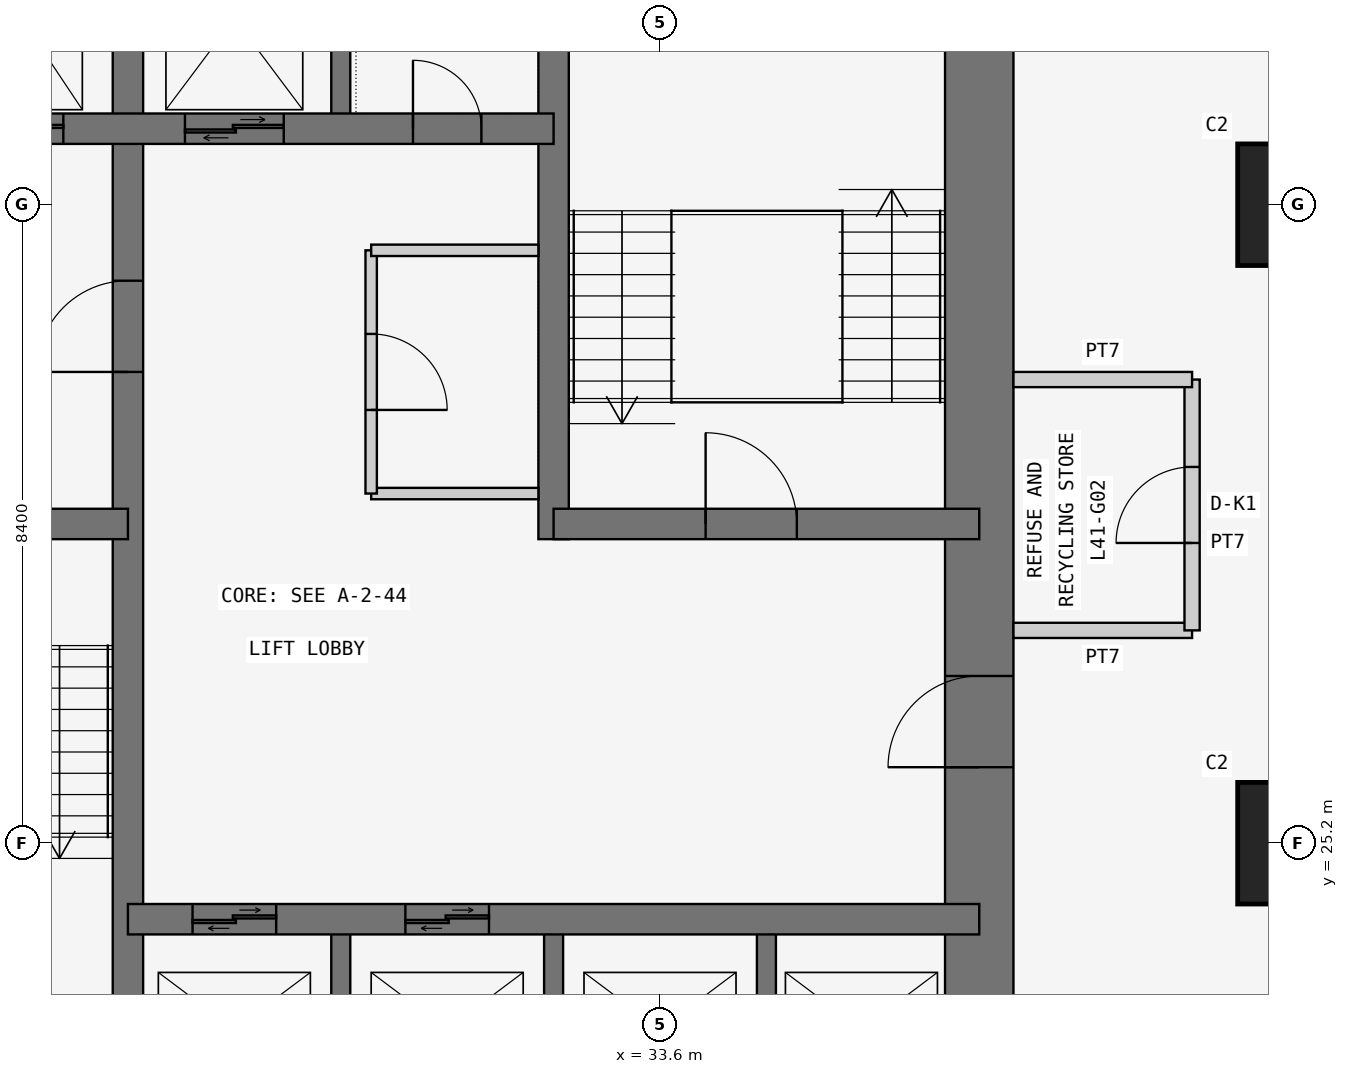
"""IFC4 building model, lengths in metres.
Left out: names, types, materials, properties, quantities, classifications, styles, units other than length and angle.
Written with IfcOpenShell. Run it as: python <this file> out.ifc"""

import sys

from ifc_helpers import new_model, si_unit, direction, frame, frame_2d, origin, origin_2d, place, context, subcontext, project, spatial, rectangle, extrude, element, fill, save


model = new_model("IFC4")
c1 = context("Model", 3, precision=1e-05, world=origin(), true_north=direction((0.0, 1.0)))
c2 = subcontext(c1, "Body", "Model", "MODEL_VIEW")
j1 = project(units=[si_unit("LENGTHUNIT", "METRE"), si_unit("PLANEANGLEUNIT", "RADIAN")], contexts=[c1])
p1 = place(None, origin())
s1 = spatial("IfcSite", under=j1, at=p1, CompositionType="ELEMENT")
p2 = place(p1, origin())
s2 = spatial("IfcBuilding", under=s1, at=p2, CompositionType="ELEMENT")
p3 = place(p2, frame((0.0, 0.0, 159.3)))
s3 = spatial("IfcBuildingStorey", under=s2, at=p3, CompositionType="ELEMENT", Elevation=159.3)
for number, where, z_axis, x_axis in (
    (1, (42.0, 25.2, 0.0), (0.0, 0.0, 1.0), (1.0, 0.0, 0.0)),
    (2, (42.0, 33.6, 0.0), (0.0, 0.0, 1.0), (1.0, 0.0, 0.0)),
):
    element("IfcColumn", number, at=place(p3, frame(where, z_axis=z_axis, x_axis=x_axis)), inside=s3, PredefinedType="COLUMN", context=c2, shape_type="SweptSolid", body=[
        extrude(rectangle(XDim=1.6, YDim=1.6, at=origin_2d()), origin(), (0.0, 0.0, 1.0), 3.6),
    ])
p4 = place(p3, frame((37.8, 21.0, 0.0), z_axis=(0.0, 0.0, 1.0), x_axis=(0.0, 1.0, 0.0)))
e3 = element("IfcWall", 3, at=p4, inside=s3, PredefinedType="SHEAR", context=c2, shape_type="SweptSolid", body=[
    extrude(rectangle(XDim=17.25, YDim=0.9, at=frame_2d((8.625, 0.0))), origin(), (0.0, 0.0, 1.0), 3.6),
])
p5 = place(p4, frame((5.2, 0.0, 0.0)))
e4 = element("IfcOpeningElement", 4, at=p5, cuts=e3, PredefinedType="OPENING", context=c2, shape_type="SweptSolid", body=[
    extrude(rectangle(XDim=1.2, YDim=2.1, at=frame_2d((0.6, 1.05))), frame((0.0, 0.46, 0.0), z_axis=(0.0, -1.0, 0.0), x_axis=(1.0, 0.0, 0.0)), (0.0, 0.0, 1.0), 0.92),
])
p6 = place(p3, frame((26.6, 21.0, 0.0), z_axis=(0.0, 0.0, 1.0), x_axis=(0.0, 1.0, 0.0)))
e5 = element("IfcWall", 5, at=p6, inside=s3, PredefinedType="SHEAR", context=c2, shape_type="SweptSolid", body=[
    extrude(rectangle(XDim=16.8, YDim=0.4, at=frame_2d((8.4, 0.0))), origin(), (0.0, 0.0, 1.0), 3.6),
])
p7 = place(p6, frame((10.4, 0.0, 0.0)))
e6 = element("IfcOpeningElement", 6, at=p7, cuts=e5, PredefinedType="OPENING", context=c2, shape_type="SweptSolid", body=[
    extrude(rectangle(XDim=1.2, YDim=2.1, at=frame_2d((0.6, 1.05))), frame((0.0, 0.21, 0.0), z_axis=(0.0, -1.0, 0.0), x_axis=(1.0, 0.0, 0.0)), (0.0, 0.0, 1.0), 0.42),
])
p8 = place(p3, frame((21.0, 29.4, 0.0), z_axis=(0.0, 0.0, 1.0), x_axis=(1.0, 0.0, 0.0)))
e7 = element("IfcWall", 7, at=p8, inside=s3, PredefinedType="SHEAR", context=c2, shape_type="SweptSolid", body=[
    extrude(rectangle(XDim=5.6, YDim=0.4, at=frame_2d((2.8, 0.0))), origin(), (0.0, 0.0, 1.0), 3.6),
])
p9 = place(p8, frame((2.3, 0.0, 0.0)))
e8 = element("IfcOpeningElement", 8, at=p9, cuts=e7, PredefinedType="OPENING", context=c2, shape_type="SweptSolid", body=[
    extrude(rectangle(XDim=1.2, YDim=2.1, at=frame_2d((0.6, 1.05))), frame((0.0, 0.21, 0.0), z_axis=(0.0, -1.0, 0.0), x_axis=(1.0, 0.0, 0.0)), (0.0, 0.0, 1.0), 0.42),
])
p10 = place(p3, frame((21.0, 34.6, 0.0), z_axis=(0.0, 0.0, 1.0), x_axis=(1.0, 0.0, 0.0)))
e9 = element("IfcWall", 9, at=p10, inside=s3, PredefinedType="SHEAR", context=c2, shape_type="SweptSolid", body=[
    extrude(rectangle(XDim=11.2, YDim=0.4, at=frame_2d((5.6, 0.0))), origin(), (0.0, 0.0, 1.0), 3.6),
])
p11 = place(p10, frame((9.35, 0.0, 0.0)))
e10 = element("IfcOpeningElement", 10, at=p11, cuts=e9, PredefinedType="OPENING", context=c2, shape_type="SweptSolid", body=[
    extrude(rectangle(XDim=0.9, YDim=2.1, at=frame_2d((0.45, 1.05))), frame((0.0, 0.21, 0.0), z_axis=(0.0, -1.0, 0.0), x_axis=(1.0, 0.0, 0.0)), (0.0, 0.0, 1.0), 0.42),
])
p12 = place(p10, frame((1.0, 0.0, 0.0)))
e11 = element("IfcOpeningElement", 11, at=p12, cuts=e9, PredefinedType="OPENING", context=c2, shape_type="SweptSolid", body=[
    extrude(rectangle(XDim=1.1, YDim=2.1, at=frame_2d((0.55, 1.05))), frame((0.0, 0.21, 0.0), z_axis=(0.0, -1.0, 0.0), x_axis=(1.0, 0.0, 0.0)), (0.0, 0.0, 1.0), 0.42),
])
p13 = place(p10, frame((3.65, 0.0, 0.0)))
e12 = element("IfcOpeningElement", 12, at=p13, cuts=e9, PredefinedType="OPENING", context=c2, shape_type="SweptSolid", body=[
    extrude(rectangle(XDim=1.1, YDim=2.1, at=frame_2d((0.55, 1.05))), frame((0.0, 0.21, 0.0), z_axis=(0.0, -1.0, 0.0), x_axis=(1.0, 0.0, 0.0)), (0.0, 0.0, 1.0), 0.42),
])
p14 = place(p10, frame((6.35, 0.0, 0.0)))
e13 = element("IfcOpeningElement", 13, at=p14, cuts=e9, PredefinedType="OPENING", context=c2, shape_type="SweptSolid", body=[
    extrude(rectangle(XDim=1.3, YDim=2.1, at=frame_2d((0.65, 1.05))), frame((0.0, 0.21, 0.0), z_axis=(0.0, -1.0, 0.0), x_axis=(1.0, 0.0, 0.0)), (0.0, 0.0, 1.0), 0.42),
])
p15 = place(p3, frame((26.6, 24.2, 0.0), z_axis=(0.0, 0.0, 1.0), x_axis=(1.0, 0.0, 0.0)))
e14 = element("IfcWall", 14, at=p15, inside=s3, PredefinedType="SHEAR", context=c2, shape_type="SweptSolid", body=[
    extrude(rectangle(XDim=11.2, YDim=0.4, at=frame_2d((5.6, 0.0))), origin(), (0.0, 0.0, 1.0), 3.6),
])
p16 = place(p15, frame((0.85, 0.0, 0.0)))
e15 = element("IfcOpeningElement", 15, at=p16, cuts=e14, PredefinedType="OPENING", context=c2, shape_type="SweptSolid", body=[
    extrude(rectangle(XDim=1.1, YDim=2.1, at=frame_2d((0.55, 1.05))), frame((0.0, 0.21, 0.0), z_axis=(0.0, -1.0, 0.0), x_axis=(1.0, 0.0, 0.0)), (0.0, 0.0, 1.0), 0.42),
])
p17 = place(p15, frame((3.65, 0.0, 0.0)))
e16 = element("IfcOpeningElement", 16, at=p17, cuts=e14, PredefinedType="OPENING", context=c2, shape_type="SweptSolid", body=[
    extrude(rectangle(XDim=1.1, YDim=2.1, at=frame_2d((0.55, 1.05))), frame((0.0, 0.21, 0.0), z_axis=(0.0, -1.0, 0.0), x_axis=(1.0, 0.0, 0.0)), (0.0, 0.0, 1.0), 0.42),
])
p18 = place(p3, frame((32.2, 29.2, 0.0), z_axis=(0.0, 0.0, 1.0), x_axis=(0.0, 1.0, 0.0)))
e17 = element("IfcWall", 17, at=p18, inside=s3, PredefinedType="SHEAR", context=c2, shape_type="SweptSolid", body=[
    extrude(rectangle(XDim=8.6, YDim=0.4, at=frame_2d((4.3, 0.0))), origin(), (0.0, 0.0, 1.0), 3.6),
])
p19 = place(p3, frame((32.2, 29.4, 0.0), z_axis=(0.0, 0.0, 1.0), x_axis=(1.0, 0.0, 0.0)))
e18 = element("IfcWall", 18, at=p19, inside=s3, PredefinedType="SHEAR", context=c2, shape_type="SweptSolid", body=[
    extrude(rectangle(XDim=5.6, YDim=0.4, at=frame_2d((2.8, 0.0))), origin(), (0.0, 0.0, 1.0), 3.6),
])
p20 = place(p19, frame((2.0, 0.0, 0.0)))
e19 = element("IfcOpeningElement", 19, at=p20, cuts=e18, PredefinedType="OPENING", context=c2, shape_type="SweptSolid", body=[
    extrude(rectangle(XDim=1.2, YDim=2.1, at=frame_2d((0.6, 1.05))), frame((0.0, 0.21, 0.0), z_axis=(0.0, -1.0, 0.0), x_axis=(1.0, 0.0, 0.0)), (0.0, 0.0, 1.0), 0.42),
])
for number, where, z_axis, x_axis in (
    (20, (29.4, 21.0, 0.0), (0.0, 0.0, 1.0), (0.0, 1.0, 0.0)),
    (21, (32.2, 21.0, 0.0), (0.0, 0.0, 1.0), (0.0, 1.0, 0.0)),
    (22, (35.0, 21.0, 0.0), (0.0, 0.0, 1.0), (0.0, 1.0, 0.0)),
    (23, (29.4, 34.6, 0.0), (0.0, 0.0, 1.0), (0.0, 1.0, 0.0)),
):
    element("IfcWall", number, at=place(p3, frame(where, z_axis=z_axis, x_axis=x_axis)), inside=s3, PredefinedType="SHEAR", context=c2, shape_type="SweptSolid", body=[
        extrude(rectangle(XDim=3.2, YDim=0.25, at=frame_2d((1.6, 0.0))), origin(), (0.0, 0.0, 1.0), 3.6),
    ])
p21 = place(p3, frame((38.25, 28.0, 0.0), z_axis=(0.0, 0.0, 1.0), x_axis=(1.0, 0.0, 0.0)))
e24 = element("IfcWall", 24, at=p21, inside=s3, PredefinedType="PARTITIONING", context=c2, shape_type="SweptSolid", body=[
    extrude(rectangle(XDim=2.35, YDim=0.2, at=frame_2d((1.175, 0.0))), origin(), (0.0, 0.0, 1.0), 3.45),
])
p22 = place(p3, frame((40.6, 28.0, 0.0), z_axis=(0.0, 0.0, 1.0), x_axis=(0.0, 1.0, 0.0)))
e25 = element("IfcWall", 25, at=p22, inside=s3, PredefinedType="PARTITIONING", context=c2, shape_type="SweptSolid", body=[
    extrude(rectangle(XDim=3.3, YDim=0.2, at=frame_2d((1.65, 0.0))), origin(), (0.0, 0.0, 1.0), 3.45),
])
p23 = place(p22, frame((1.15, 0.0, 0.0)))
e26 = element("IfcOpeningElement", 26, at=p23, cuts=e25, PredefinedType="OPENING", context=c2, shape_type="SweptSolid", body=[
    extrude(rectangle(XDim=1.0, YDim=2.1, at=frame_2d((0.5, 1.05))), frame((0.0, 0.11, 0.0), z_axis=(0.0, -1.0, 0.0), x_axis=(1.0, 0.0, 0.0)), (0.0, 0.0, 1.0), 0.22),
])
p24 = place(p3, frame((40.6, 31.3, 0.0), z_axis=(0.0, 0.0, 1.0), x_axis=(-1.0, 0.0, 0.0)))
e27 = element("IfcWall", 27, at=p24, inside=s3, PredefinedType="PARTITIONING", context=c2, shape_type="SweptSolid", body=[
    extrude(rectangle(XDim=2.35, YDim=0.2, at=frame_2d((1.175, 0.0))), origin(), (0.0, 0.0, 1.0), 3.45),
])
p25 = place(p3, frame((32.0, 29.8, 0.0), z_axis=(0.0, 0.0, 1.0), x_axis=(-1.0, 0.0, 0.0)))
e28 = element("IfcWall", 28, at=p25, inside=s3, PredefinedType="PARTITIONING", context=c2, shape_type="SweptSolid", body=[
    extrude(rectangle(XDim=2.2, YDim=0.15, at=frame_2d((1.1, 0.0))), origin(), (0.0, 0.0, 1.0), 3.45),
])
p26 = place(p3, frame((29.8, 29.8, 0.0), z_axis=(0.0, 0.0, 1.0), x_axis=(0.0, 1.0, 0.0)))
e29 = element("IfcWall", 29, at=p26, inside=s3, PredefinedType="PARTITIONING", context=c2, shape_type="SweptSolid", body=[
    extrude(rectangle(XDim=3.2, YDim=0.15, at=frame_2d((1.6, 0.0))), origin(), (0.0, 0.0, 1.0), 3.45),
])
p27 = place(p26, frame((1.1, 0.0, 0.0)))
e30 = element("IfcOpeningElement", 30, at=p27, cuts=e29, PredefinedType="OPENING", context=c2, shape_type="SweptSolid", body=[
    extrude(rectangle(XDim=1.0, YDim=2.1, at=frame_2d((0.5, 1.05))), frame((0.0, 0.085, 0.0), z_axis=(0.0, -1.0, 0.0), x_axis=(1.0, 0.0, 0.0)), (0.0, 0.0, 1.0), 0.17),
])
p28 = place(p3, frame((29.8, 33.0, 0.0), z_axis=(0.0, 0.0, 1.0), x_axis=(1.0, 0.0, 0.0)))
e31 = element("IfcWall", 31, at=p28, inside=s3, PredefinedType="PARTITIONING", context=c2, shape_type="SweptSolid", body=[
    extrude(rectangle(XDim=2.2, YDim=0.15, at=frame_2d((1.1, 0.0))), origin(), (0.0, 0.0, 1.0), 3.45),
])
p29 = place(p23, origin())
e32 = element("IfcDoor", 32, at=p29, inside=s3, OperationType="SINGLE_SWING_LEFT", PredefinedType="DOOR", context=c2, shape_type="SweptSolid", body=[
    extrude(rectangle(XDim=1.0, YDim=2.1, at=frame_2d((0.5, 1.05))), frame((0.0, 0.025, 0.0), z_axis=(0.0, -1.0, 0.0), x_axis=(1.0, 0.0, 0.0)), (0.0, 0.0, 1.0), 0.05),
])
fill(e26, e32)
p30 = place(p7, origin())
e33 = element("IfcDoor", 33, at=p30, inside=s3, OperationType="SINGLE_SWING_LEFT", PredefinedType="DOOR", context=c2, shape_type="SweptSolid", body=[
    extrude(rectangle(XDim=1.2, YDim=2.1, at=frame_2d((0.6, 1.05))), frame((0.0, 0.025, 0.0), z_axis=(0.0, -1.0, 0.0), x_axis=(1.0, 0.0, 0.0)), (0.0, 0.0, 1.0), 0.05),
])
fill(e6, e33)
p31 = place(p5, origin())
e34 = element("IfcDoor", 34, at=p31, inside=s3, OperationType="SINGLE_SWING_LEFT", PredefinedType="DOOR", context=c2, shape_type="SweptSolid", body=[
    extrude(rectangle(XDim=1.2, YDim=2.1, at=frame_2d((0.6, 1.05))), frame((0.0, 0.025, 0.0), z_axis=(0.0, -1.0, 0.0), x_axis=(1.0, 0.0, 0.0)), (0.0, 0.0, 1.0), 0.05),
])
fill(e4, e34)
p32 = place(p20, origin())
e35 = element("IfcDoor", 35, at=p32, inside=s3, OperationType="SINGLE_SWING_LEFT", PredefinedType="DOOR", context=c2, shape_type="SweptSolid", body=[
    extrude(rectangle(XDim=1.2, YDim=2.1, at=frame_2d((0.6, 1.05))), frame((0.0, 0.025, 0.0), z_axis=(0.0, -1.0, 0.0), x_axis=(1.0, 0.0, 0.0)), (0.0, 0.0, 1.0), 0.05),
])
fill(e19, e35)
p33 = place(p11, origin())
e36 = element("IfcDoor", 36, at=p33, inside=s3, OperationType="SINGLE_SWING_LEFT", PredefinedType="DOOR", context=c2, shape_type="SweptSolid", body=[
    extrude(rectangle(XDim=0.9, YDim=2.1, at=frame_2d((0.45, 1.05))), frame((0.0, 0.025, 0.0), z_axis=(0.0, -1.0, 0.0), x_axis=(1.0, 0.0, 0.0)), (0.0, 0.0, 1.0), 0.05),
])
fill(e10, e36)
p34 = place(p27, frame((1.0, 0.0, 0.0), z_axis=(0.0, 0.0, 1.0), x_axis=(-1.0, 0.0, 0.0)))
e37 = element("IfcDoor", 37, at=p34, inside=s3, OperationType="SINGLE_SWING_RIGHT", PredefinedType="DOOR", context=c2, shape_type="SweptSolid", body=[
    extrude(rectangle(XDim=1.0, YDim=2.1, at=frame_2d((0.5, 1.05))), frame((0.0, 0.025, 0.0), z_axis=(0.0, -1.0, 0.0), x_axis=(1.0, 0.0, 0.0)), (0.0, 0.0, 1.0), 0.05),
])
fill(e30, e37)
p35 = place(p16, origin())
e38 = element("IfcDoor", 38, at=p35, inside=s3, OperationType="DOUBLE_DOOR_SLIDING", PredefinedType="DOOR", context=c2, shape_type="SweptSolid", body=[
    extrude(rectangle(XDim=1.1, YDim=2.1, at=frame_2d((0.55, 1.05))), frame((0.0, 0.025, 0.0), z_axis=(0.0, -1.0, 0.0), x_axis=(1.0, 0.0, 0.0)), (0.0, 0.0, 1.0), 0.05),
])
fill(e15, e38)
p36 = place(p17, origin())
e39 = element("IfcDoor", 39, at=p36, inside=s3, OperationType="DOUBLE_DOOR_SLIDING", PredefinedType="DOOR", context=c2, shape_type="SweptSolid", body=[
    extrude(rectangle(XDim=1.1, YDim=2.1, at=frame_2d((0.55, 1.05))), frame((0.0, 0.025, 0.0), z_axis=(0.0, -1.0, 0.0), x_axis=(1.0, 0.0, 0.0)), (0.0, 0.0, 1.0), 0.05),
])
fill(e16, e39)
p37 = place(p13, origin())
e40 = element("IfcDoor", 40, at=p37, inside=s3, OperationType="DOUBLE_DOOR_SLIDING", PredefinedType="DOOR", context=c2, shape_type="SweptSolid", body=[
    extrude(rectangle(XDim=1.1, YDim=2.1, at=frame_2d((0.55, 1.05))), frame((0.0, 0.025, 0.0), z_axis=(0.0, -1.0, 0.0), x_axis=(1.0, 0.0, 0.0)), (0.0, 0.0, 1.0), 0.05),
])
fill(e12, e40)
p38 = place(p14, origin())
e41 = element("IfcDoor", 41, at=p38, inside=s3, OperationType="DOUBLE_DOOR_SLIDING", PredefinedType="DOOR", context=c2, shape_type="SweptSolid", body=[
    extrude(rectangle(XDim=1.3, YDim=2.1, at=frame_2d((0.65, 1.05))), frame((0.0, 0.025, 0.0), z_axis=(0.0, -1.0, 0.0), x_axis=(1.0, 0.0, 0.0)), (0.0, 0.0, 1.0), 0.05),
])
fill(e13, e41)
save(model, sys.argv[1])
